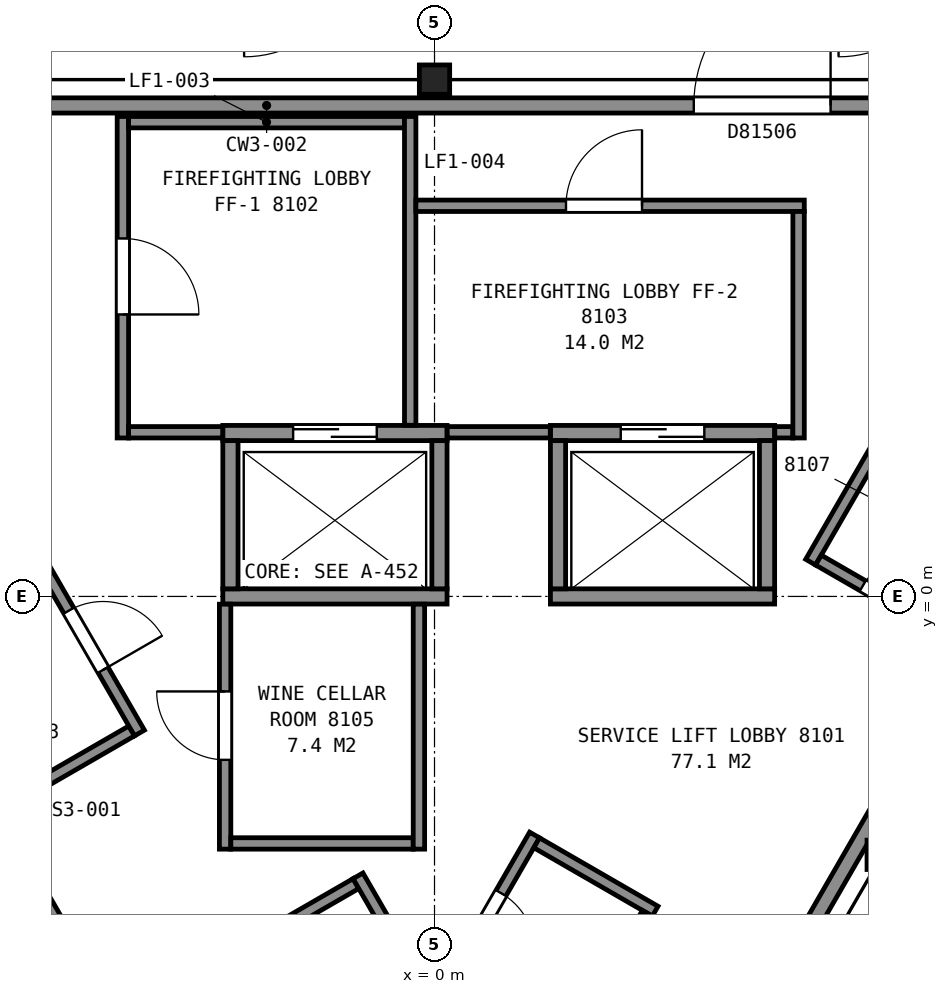
"""IFC4 building model, lengths in metres.
Left out: names, types, materials, properties, quantities, classifications, styles, units other than length and angle.
Written with IfcOpenShell. Run it as: python <this file> out.ifc"""

import sys

from ifc_helpers import new_model, si_unit, direction, frame, frame_2d, origin, origin_2d, place, context, subcontext, project, spatial, rectangle, i_section, extrude, element, fill, save


model = new_model("IFC4")
c1 = context("Model", 3, precision=1e-05, world=origin(), true_north=direction((0.0, 1.0)))
c2 = subcontext(c1, "Body", "Model", "MODEL_VIEW")
j1 = project(units=[si_unit("LENGTHUNIT", "METRE"), si_unit("PLANEANGLEUNIT", "RADIAN")], contexts=[c1])
p1 = place(None, origin())
s1 = spatial("IfcSite", under=j1, at=p1, CompositionType="ELEMENT")
p2 = place(p1, origin())
s2 = spatial("IfcBuilding", under=s1, at=p2, CompositionType="ELEMENT")
p3 = place(p2, frame((0.0, 0.0, 321.0)))
s3 = spatial("IfcBuildingStorey", under=s2, at=p3, CompositionType="ELEMENT", Elevation=321.0)
for number, where, z_axis, x_axis in (
    (1, (0.0, 6.8, 0.0), (0.0, 0.0, 1.0), (1.0, 0.0, 0.0)),
    (2, (5.89, -3.4, 0.0), (0.0, 0.0, 1.0), (1.0, 0.0, 0.0)),
):
    element("IfcColumn", number, at=place(p3, frame(where, z_axis=z_axis, x_axis=x_axis)), inside=s3, PredefinedType="COLUMN", context=c2, shape_type="SweptSolid", body=[
        extrude(i_section(OverallWidth=0.399, OverallDepth=0.386, WebThickness=0.021, FlangeThickness=0.033, FilletRadius=0.015, at=origin_2d()), origin(), (0.0, 0.0, 1.0), 4.2),
    ])
p4 = place(p3, frame((-2.785, 0.0, 0.0), z_axis=(0.0, 0.0, 1.0), x_axis=(1.0, 0.0, 0.0)))
e3 = element("IfcWall", 3, at=p4, inside=s3, PredefinedType="PARTITIONING", context=c2, shape_type="SweptSolid", body=[
    extrude(rectangle(XDim=2.95, YDim=0.2, at=frame_2d((1.475, 0.0))), origin(), (0.0, 0.0, 1.0), 4.2),
])
p5 = place(p3, frame((1.525, 0.0, 0.0), z_axis=(0.0, 0.0, 1.0), x_axis=(1.0, 0.0, 0.0)))
e4 = element("IfcWall", 4, at=p5, inside=s3, PredefinedType="PARTITIONING", context=c2, shape_type="SweptSolid", body=[
    extrude(rectangle(XDim=2.95, YDim=0.2, at=frame_2d((1.475, 0.0))), origin(), (0.0, 0.0, 1.0), 4.2),
])
p6 = place(p3, frame((-2.785, 2.15, 0.0), z_axis=(0.0, 0.0, 1.0), x_axis=(1.0, 0.0, 0.0)))
e5 = element("IfcWall", 5, at=p6, inside=s3, PredefinedType="PARTITIONING", context=c2, shape_type="SweptSolid", body=[
    extrude(rectangle(XDim=2.95, YDim=0.2, at=frame_2d((1.475, 0.0))), origin(), (0.0, 0.0, 1.0), 4.2),
])
p7 = place(p6, frame((0.925, 0.0, 0.0)))
e6 = element("IfcOpeningElement", 6, at=p7, cuts=e5, PredefinedType="OPENING", context=c2, shape_type="SweptSolid", body=[
    extrude(rectangle(XDim=1.1, YDim=2.1, at=frame_2d((0.55, 1.05))), frame((0.0, 0.11, 0.0), z_axis=(0.0, -1.0, 0.0), x_axis=(1.0, 0.0, 0.0)), (0.0, 0.0, 1.0), 0.22),
])
p8 = place(p3, frame((1.525, 2.15, 0.0), z_axis=(0.0, 0.0, 1.0), x_axis=(1.0, 0.0, 0.0)))
e7 = element("IfcWall", 7, at=p8, inside=s3, PredefinedType="PARTITIONING", context=c2, shape_type="SweptSolid", body=[
    extrude(rectangle(XDim=2.95, YDim=0.2, at=frame_2d((1.475, 0.0))), origin(), (0.0, 0.0, 1.0), 4.2),
])
p9 = place(p8, frame((0.925, 0.0, 0.0)))
e8 = element("IfcOpeningElement", 8, at=p9, cuts=e7, PredefinedType="OPENING", context=c2, shape_type="SweptSolid", body=[
    extrude(rectangle(XDim=1.1, YDim=2.1, at=frame_2d((0.55, 1.05))), frame((0.0, 0.11, 0.0), z_axis=(0.0, -1.0, 0.0), x_axis=(1.0, 0.0, 0.0)), (0.0, 0.0, 1.0), 0.22),
])
for number, where, z_axis, x_axis in (
    (9, (4.375, 0.1, 0.0), (0.0, 0.0, 1.0), (0.0, 1.0, 0.0)),
    (10, (1.625, 0.1, 0.0), (0.0, 0.0, 1.0), (0.0, 1.0, 0.0)),
    (11, (0.065, 0.1, 0.0), (0.0, 0.0, 1.0), (0.0, 1.0, 0.0)),
    (12, (-2.685, 0.1, 0.0), (0.0, 0.0, 1.0), (0.0, 1.0, 0.0)),
):
    element("IfcWall", number, at=place(p3, frame(where, z_axis=z_axis, x_axis=x_axis)), inside=s3, PredefinedType="PARTITIONING", context=c2, shape_type="SweptSolid", body=[
        extrude(rectangle(XDim=1.95, YDim=0.2, at=frame_2d((0.975, 0.0))), origin(), (0.0, 0.0, 1.0), 4.2),
    ])
p10 = place(p3, frame((7.829, 6.46, 0.0), z_axis=(0.0, 0.0, 1.0), x_axis=(-1.0, 0.0, 0.0)))
e13 = element("IfcWall", 13, at=p10, inside=s3, PredefinedType="PARTITIONING", context=c2, shape_type="SweptSolid", body=[
    extrude(rectangle(XDim=15.658, YDim=0.2, at=frame_2d((7.829, 0.0))), origin(), (0.0, 0.0, 1.0), 3.95),
])
p11 = place(p10, frame((2.618, 0.0, 0.0)))
e14 = element("IfcOpeningElement", 14, at=p11, cuts=e13, PredefinedType="OPENING", context=c2, shape_type="SweptSolid", body=[
    extrude(rectangle(XDim=1.8, YDim=2.1, at=frame_2d((0.9, 1.05))), frame((0.0, 0.11, 0.0), z_axis=(0.0, -1.0, 0.0), x_axis=(1.0, 0.0, 0.0)), (0.0, 0.0, 1.0), 0.22),
])
p12 = place(p3, frame((-7.141, -0.551, 0.0), z_axis=(0.0, 0.0, 1.0), x_axis=(0.499992795234, -0.866029563418, 0.0)))
e15 = element("IfcWall", 15, at=p12, inside=s3, PredefinedType="PARTITIONING", context=c2, shape_type="SweptSolid", body=[
    extrude(rectangle(XDim=9.198, YDim=0.2, at=frame_2d((4.599, 0.0))), origin(), (0.0, 0.0, 1.0), 3.95),
])
p13 = place(p12, frame((4.634, 0.0, 0.0)))
e16 = element("IfcOpeningElement", 16, at=p13, cuts=e15, PredefinedType="OPENING", context=c2, shape_type="SweptSolid", body=[
    extrude(rectangle(XDim=1.8, YDim=2.1, at=frame_2d((0.9, 1.05))), frame((0.0, 0.11, 0.0), z_axis=(0.0, -1.0, 0.0), x_axis=(1.0, 0.0, 0.0)), (0.0, 0.0, 1.0), 0.22),
])
p14 = place(p3, frame((-5.737, -2.782, 0.0), z_axis=(0.0, 0.0, 1.0), x_axis=(0.866000843773, 0.500042536776, 0.0)))
e17 = element("IfcWall", 17, at=p14, inside=s3, PredefinedType="PARTITIONING", context=c2, shape_type="SweptSolid", body=[
    extrude(rectangle(XDim=2.025, YDim=0.15, at=frame_2d((1.012, 0.0))), origin(), (0.0, 0.0, 1.0), 3.95),
])
p15 = place(p3, frame((-3.882, -1.797, 0.0), z_axis=(0.0, 0.0, 1.0), x_axis=(-0.500016307898, 0.86601598821, 0.0)))
e18 = element("IfcWall", 18, at=p15, inside=s3, PredefinedType="PARTITIONING", context=c2, shape_type="SweptSolid", body=[
    extrude(rectangle(XDim=2.709, YDim=0.15, at=frame_2d((1.354, 0.0))), origin(), (0.0, 0.0, 1.0), 3.95),
])
p16 = place(p15, frame((0.959, 0.0, 0.0)))
e19 = element("IfcOpeningElement", 19, at=p16, cuts=e18, PredefinedType="OPENING", context=c2, shape_type="SweptSolid", body=[
    extrude(rectangle(XDim=0.9, YDim=2.1, at=frame_2d((0.45, 1.05))), frame((0.0, 0.085, 0.0), z_axis=(0.0, -1.0, 0.0), x_axis=(1.0, 0.0, 0.0)), (0.0, 0.0, 1.0), 0.17),
])
p17 = place(p3, frame((-4.1, 2.085, 0.0), z_axis=(0.0, 0.0, 1.0), x_axis=(0.0, 1.0, 0.0)))
e20 = element("IfcWall", 20, at=p17, inside=s3, PredefinedType="PARTITIONING", context=c2, shape_type="SweptSolid", body=[
    extrude(rectangle(XDim=4.23, YDim=0.15, at=frame_2d((2.115, 0.0))), origin(), (0.0, 0.0, 1.0), 3.95),
])
p18 = place(p17, frame((1.625, 0.0, 0.0)))
e21 = element("IfcOpeningElement", 21, at=p18, cuts=e20, PredefinedType="OPENING", context=c2, shape_type="SweptSolid", body=[
    extrude(rectangle(XDim=1.0, YDim=2.1, at=frame_2d((0.5, 1.05))), frame((0.0, 0.085, 0.0), z_axis=(0.0, -1.0, 0.0), x_axis=(1.0, 0.0, 0.0)), (0.0, 0.0, 1.0), 0.17),
])
p19 = place(p3, frame((-4.025, 2.16, 0.0), z_axis=(0.0, 0.0, 1.0), x_axis=(1.0, 0.0, 0.0)))
e22 = element("IfcWall", 22, at=p19, inside=s3, PredefinedType="PARTITIONING", context=c2, shape_type="SweptSolid", body=[
    extrude(rectangle(XDim=1.238, YDim=0.15, at=frame_2d((0.619, 0.0))), origin(), (0.0, 0.0, 1.0), 3.95),
])
p20 = place(p3, frame((-4.025, 6.24, 0.0), z_axis=(0.0, 0.0, 1.0), x_axis=(1.0, 0.0, 0.0)))
e23 = element("IfcWall", 23, at=p20, inside=s3, PredefinedType="PARTITIONING", context=c2, shape_type="SweptSolid", body=[
    extrude(rectangle(XDim=3.63, YDim=0.15, at=frame_2d((1.815, 0.0))), origin(), (0.0, 0.0, 1.0), 3.95),
])
p21 = place(p3, frame((-2.755, -0.102, 0.0), z_axis=(0.0, 0.0, 1.0), x_axis=(0.0, -1.0, 0.0)))
e24 = element("IfcWall", 24, at=p21, inside=s3, PredefinedType="PARTITIONING", context=c2, shape_type="SweptSolid", body=[
    extrude(rectangle(XDim=3.223, YDim=0.15, at=frame_2d((1.611, 0.0))), origin(), (0.0, 0.0, 1.0), 3.95),
])
p22 = place(p21, frame((1.148, 0.0, 0.0)))
e25 = element("IfcOpeningElement", 25, at=p22, cuts=e24, PredefinedType="OPENING", context=c2, shape_type="SweptSolid", body=[
    extrude(rectangle(XDim=0.9, YDim=2.1, at=frame_2d((0.45, 1.05))), frame((0.0, 0.085, 0.0), z_axis=(0.0, -1.0, 0.0), x_axis=(1.0, 0.0, 0.0)), (0.0, 0.0, 1.0), 0.17),
])
p23 = place(p3, frame((-2.68, -3.25, 0.0), z_axis=(0.0, 0.0, 1.0), x_axis=(1.0, 0.0, 0.0)))
e26 = element("IfcWall", 26, at=p23, inside=s3, PredefinedType="PARTITIONING", context=c2, shape_type="SweptSolid", body=[
    extrude(rectangle(XDim=2.4, YDim=0.15, at=frame_2d((1.2, 0.0))), origin(), (0.0, 0.0, 1.0), 3.95),
])
p24 = place(p3, frame((-2.593, -4.678, 0.0), z_axis=(0.0, 0.0, 1.0), x_axis=(0.866081705922, 0.499902469156, 0.0)))
e27 = element("IfcWall", 27, at=p24, inside=s3, PredefinedType="PARTITIONING", context=c2, shape_type="SweptSolid", body=[
    extrude(rectangle(XDim=1.8, YDim=0.15, at=frame_2d((0.9, 0.0))), origin(), (0.0, 0.0, 1.0), 3.95),
])
p25 = place(p3, frame((-1.007, -3.676, 0.0), z_axis=(0.0, 0.0, 1.0), x_axis=(0.500037662692, -0.866003658127, 0.0)))
e28 = element("IfcWall", 28, at=p25, inside=s3, PredefinedType="PARTITIONING", context=c2, shape_type="SweptSolid", body=[
    extrude(rectangle(XDim=4.425, YDim=0.15, at=frame_2d((2.212, 0.0))), origin(), (0.0, 0.0, 1.0), 3.95),
])
p26 = place(p3, frame((-0.32, 2.252, 0.0), z_axis=(0.0, 0.0, 1.0), x_axis=(0.0, 1.0, 0.0)))
e29 = element("IfcWall", 29, at=p26, inside=s3, PredefinedType="PARTITIONING", context=c2, shape_type="SweptSolid", body=[
    extrude(rectangle(XDim=4.063, YDim=0.15, at=frame_2d((2.031, 0.0))), origin(), (0.0, 0.0, 1.0), 3.95),
])
p27 = place(p3, frame((-0.245, 5.14, 0.0), z_axis=(0.0, 0.0, 1.0), x_axis=(1.0, 0.0, 0.0)))
e30 = element("IfcWall", 30, at=p27, inside=s3, PredefinedType="PARTITIONING", context=c2, shape_type="SweptSolid", body=[
    extrude(rectangle(XDim=5.11, YDim=0.15, at=frame_2d((2.555, 0.0))), origin(), (0.0, 0.0, 1.0), 3.95),
])
p28 = place(p27, frame((1.975, 0.0, 0.0)))
e31 = element("IfcOpeningElement", 31, at=p28, cuts=e30, PredefinedType="OPENING", context=c2, shape_type="SweptSolid", body=[
    extrude(rectangle(XDim=1.0, YDim=2.1, at=frame_2d((0.5, 1.05))), frame((0.0, 0.085, 0.0), z_axis=(0.0, -1.0, 0.0), x_axis=(1.0, 0.0, 0.0)), (0.0, 0.0, 1.0), 0.17),
])
p29 = place(p3, frame((-0.205, -3.325, 0.0), z_axis=(0.0, 0.0, 1.0), x_axis=(0.0, 1.0, 0.0)))
e32 = element("IfcWall", 32, at=p29, inside=s3, PredefinedType="PARTITIONING", context=c2, shape_type="SweptSolid", body=[
    extrude(rectangle(XDim=3.223, YDim=0.15, at=frame_2d((1.611, 0.0))), origin(), (0.0, 0.0, 1.0), 3.95),
])
p30 = place(p3, frame((1.316, -3.139, 0.0), z_axis=(0.0, 0.0, 1.0), x_axis=(-0.500063042646, -0.865989003036, 0.0)))
e33 = element("IfcWall", 33, at=p30, inside=s3, PredefinedType="PARTITIONING", context=c2, shape_type="SweptSolid", body=[
    extrude(rectangle(XDim=2.503, YDim=0.15, at=frame_2d((1.251, 0.0))), origin(), (0.0, 0.0, 1.0), 3.95),
])
p31 = place(p30, frame((0.883, 0.0, 0.0)))
e34 = element("IfcOpeningElement", 34, at=p31, cuts=e33, PredefinedType="OPENING", context=c2, shape_type="SweptSolid", body=[
    extrude(rectangle(XDim=0.9, YDim=2.1, at=frame_2d((0.45, 1.05))), frame((0.0, 0.085, 0.0), z_axis=(0.0, -1.0, 0.0), x_axis=(1.0, 0.0, 0.0)), (0.0, 0.0, 1.0), 0.17),
])
p32 = place(p3, frame((0.167, 2.16, 0.0), z_axis=(0.0, 0.0, 1.0), x_axis=(1.0, 0.0, 0.0)))
e35 = element("IfcWall", 35, at=p32, inside=s3, PredefinedType="PARTITIONING", context=c2, shape_type="SweptSolid", body=[
    extrude(rectangle(XDim=1.356, YDim=0.15, at=frame_2d((0.678, 0.0))), origin(), (0.0, 0.0, 1.0), 3.95),
])
p33 = place(p3, frame((1.344, -3.241, 0.0), z_axis=(0.0, 0.0, 1.0), x_axis=(0.865989075817, -0.500062916607, 0.0)))
e36 = element("IfcWall", 36, at=p33, inside=s3, PredefinedType="PARTITIONING", context=c2, shape_type="SweptSolid", body=[
    extrude(rectangle(XDim=1.8, YDim=0.15, at=frame_2d((0.9, 0.0))), origin(), (0.0, 0.0, 1.0), 3.95),
])
p34 = place(p3, frame((2.176, -5.251, 0.0), z_axis=(0.0, 0.0, 1.0), x_axis=(0.500173430036, 0.86592525075, 0.0)))
e37 = element("IfcWall", 37, at=p34, inside=s3, PredefinedType="PARTITIONING", context=c2, shape_type="SweptSolid", body=[
    extrude(rectangle(XDim=1.25, YDim=0.15, at=frame_2d((0.625, 0.0))), origin(), (0.0, 0.0, 1.0), 3.95),
])
p35 = place(p3, frame((2.552, -8.5, 0.0), z_axis=(0.0, 0.0, 1.0), x_axis=(0.499967462014, 0.866044188784, 0.0)))
e38 = element("IfcWall", 38, at=p35, inside=s3, PredefinedType="PARTITIONING", context=c2, shape_type="SweptSolid", body=[
    extrude(rectangle(XDim=13.025, YDim=0.2, at=frame_2d((6.512, 0.0))), origin(), (0.0, 0.0, 1.0), 3.95),
])
p36 = place(p3, frame((4.477, 2.16, 0.0), z_axis=(0.0, 0.0, 1.0), x_axis=(1.0, 0.0, 0.0)))
e39 = element("IfcWall", 39, at=p36, inside=s3, PredefinedType="PARTITIONING", context=c2, shape_type="SweptSolid", body=[
    extrude(rectangle(XDim=0.238, YDim=0.15, at=frame_2d((0.119, 0.0))), origin(), (0.0, 0.0, 1.0), 3.95),
])
p37 = place(p3, frame((4.79, 2.085, 0.0), z_axis=(0.0, 0.0, 1.0), x_axis=(0.0, 1.0, 0.0)))
e40 = element("IfcWall", 40, at=p37, inside=s3, PredefinedType="PARTITIONING", context=c2, shape_type="SweptSolid", body=[
    extrude(rectangle(XDim=2.98, YDim=0.15, at=frame_2d((1.49, 0.0))), origin(), (0.0, 0.0, 1.0), 3.95),
])
p38 = place(p3, frame((6.946, 3.91, 0.0), z_axis=(0.0, 0.0, 1.0), x_axis=(-0.50003111728, -0.866007437469, 0.0)))
e41 = element("IfcWall", 41, at=p38, inside=s3, PredefinedType="PARTITIONING", context=c2, shape_type="SweptSolid", body=[
    extrude(rectangle(XDim=3.994, YDim=0.15, at=frame_2d((1.997, 0.0))), origin(), (0.0, 0.0, 1.0), 3.95),
])
p39 = place(p38, frame((0.519, 0.0, 0.0)))
e42 = element("IfcOpeningElement", 42, at=p39, cuts=e41, PredefinedType="OPENING", context=c2, shape_type="SweptSolid", body=[
    extrude(rectangle(XDim=0.9, YDim=2.1, at=frame_2d((0.45, 1.05))), frame((0.0, 0.085, 0.0), z_axis=(0.0, -1.0, 0.0), x_axis=(1.0, 0.0, 0.0)), (0.0, 0.0, 1.0), 0.17),
])
p40 = place(p3, frame((5.051, 0.479, 0.0), z_axis=(0.0, 0.0, 1.0), x_axis=(0.865944298464, -0.500140452231, 0.0)))
e43 = element("IfcWall", 43, at=p40, inside=s3, PredefinedType="PARTITIONING", context=c2, shape_type="SweptSolid", body=[
    extrude(rectangle(XDim=2.224, YDim=0.15, at=frame_2d((1.112, 0.0))), origin(), (0.0, 0.0, 1.0), 3.95),
])
p41 = place(p40, frame((0.675, 0.0, 0.0)))
e44 = element("IfcOpeningElement", 44, at=p41, cuts=e43, PredefinedType="OPENING", context=c2, shape_type="SweptSolid", body=[
    extrude(rectangle(XDim=0.9, YDim=2.1, at=frame_2d((0.45, 1.05))), frame((0.0, 0.085, 0.0), z_axis=(0.0, -1.0, 0.0), x_axis=(1.0, 0.0, 0.0)), (0.0, 0.0, 1.0), 0.17),
])
p42 = place(p3, frame((-3.744, -10.714, 0.0), z_axis=(0.0, 0.0, 1.0), x_axis=(-0.500044034969, 0.86599997869, 0.0)))
e45 = element("IfcWall", 45, at=p42, inside=s3, PredefinedType="PARTITIONING", context=c2, shape_type="SweptSolid", body=[
    extrude(rectangle(XDim=15.553, YDim=0.1, at=frame_2d((7.776, 0.0))), origin(), (0.0, 0.0, 1.0), 3.297),
])
p43 = place(p42, frame((7.814, 0.0, 0.0)))
e46 = element("IfcOpeningElement", 46, at=p43, cuts=e45, PredefinedType="OPENING", context=c2, shape_type="SweptSolid", body=[
    extrude(rectangle(XDim=1.5, YDim=2.1, at=frame_2d((0.75, 1.05))), frame((0.0, 0.06, 0.0), z_axis=(0.0, -1.0, 0.0), x_axis=(1.0, 0.0, 0.0)), (0.0, 0.0, 1.0), 0.12),
])
p44 = place(p3, frame((11.521, 2.754, 0.0), z_axis=(0.0, 0.0, 1.0), x_axis=(-0.500044034969, -0.86599997869, 0.0)))
e47 = element("IfcWall", 47, at=p44, inside=s3, PredefinedType="PARTITIONING", context=c2, shape_type="SweptSolid", body=[
    extrude(rectangle(XDim=15.553, YDim=0.1, at=frame_2d((7.776, 0.0))), origin(), (0.0, 0.0, 1.0), 3.297),
])
p45 = place(p44, frame((13.803, 0.0, 0.0)))
e48 = element("IfcOpeningElement", 48, at=p45, cuts=e47, PredefinedType="OPENING", context=c2, shape_type="SweptSolid", body=[
    extrude(rectangle(XDim=1.2, YDim=2.1, at=frame_2d((0.6, 1.05))), frame((0.0, 0.06, 0.0), z_axis=(0.0, -1.0, 0.0), x_axis=(1.0, 0.0, 0.0)), (0.0, 0.0, 1.0), 0.12),
])
p46 = place(p44, frame((8.665, 0.0, 0.0)))
e49 = element("IfcOpeningElement", 49, at=p46, cuts=e47, PredefinedType="OPENING", context=c2, shape_type="SweptSolid", body=[
    extrude(rectangle(XDim=1.2, YDim=2.1, at=frame_2d((0.6, 1.05))), frame((0.0, 0.06, 0.0), z_axis=(0.0, -1.0, 0.0), x_axis=(1.0, 0.0, 0.0)), (0.0, 0.0, 1.0), 0.12),
])
p47 = place(p44, frame((2.049, 0.0, 0.0)))
e50 = element("IfcOpeningElement", 50, at=p47, cuts=e47, PredefinedType="OPENING", context=c2, shape_type="SweptSolid", body=[
    extrude(rectangle(XDim=1.2, YDim=2.1, at=frame_2d((0.6, 1.05))), frame((0.0, 0.06, 0.0), z_axis=(0.0, -1.0, 0.0), x_axis=(1.0, 0.0, 0.0)), (0.0, 0.0, 1.0), 0.12),
])
p48 = place(p7, origin())
e51 = element("IfcDoor", 51, at=p48, inside=s3, OperationType="SLIDING_TO_LEFT", PredefinedType="DOOR", context=c2, shape_type="SweptSolid", body=[
    extrude(rectangle(XDim=1.1, YDim=2.1, at=frame_2d((0.55, 1.05))), frame((0.0, 0.025, 0.0), z_axis=(0.0, -1.0, 0.0), x_axis=(1.0, 0.0, 0.0)), (0.0, 0.0, 1.0), 0.05),
])
fill(e6, e51)
p49 = place(p9, origin())
e52 = element("IfcDoor", 52, at=p49, inside=s3, OperationType="SLIDING_TO_RIGHT", PredefinedType="DOOR", context=c2, shape_type="SweptSolid", body=[
    extrude(rectangle(XDim=1.1, YDim=2.1, at=frame_2d((0.55, 1.05))), frame((0.0, 0.025, 0.0), z_axis=(0.0, -1.0, 0.0), x_axis=(1.0, 0.0, 0.0)), (0.0, 0.0, 1.0), 0.05),
])
fill(e8, e52)
p50 = place(p11, origin())
e53 = element("IfcDoor", 53, at=p50, inside=s3, OperationType="DOUBLE_DOOR_SINGLE_SWING", PredefinedType="DOOR", context=c2, shape_type="SweptSolid", body=[
    extrude(rectangle(XDim=1.8, YDim=2.1, at=frame_2d((0.9, 1.05))), frame((0.0, 0.025, 0.0), z_axis=(0.0, -1.0, 0.0), x_axis=(1.0, 0.0, 0.0)), (0.0, 0.0, 1.0), 0.05),
])
fill(e14, e53)
p51 = place(p16, origin())
e54 = element("IfcDoor", 54, at=p51, inside=s3, OperationType="SINGLE_SWING_LEFT", PredefinedType="DOOR", context=c2, shape_type="SweptSolid", body=[
    extrude(rectangle(XDim=0.9, YDim=2.1, at=frame_2d((0.45, 1.05))), frame((0.0, 0.025, 0.0), z_axis=(0.0, -1.0, 0.0), x_axis=(1.0, 0.0, 0.0)), (0.0, 0.0, 1.0), 0.05),
])
fill(e19, e54)
p52 = place(p18, origin())
e55 = element("IfcDoor", 55, at=p52, inside=s3, OperationType="SINGLE_SWING_LEFT", PredefinedType="DOOR", context=c2, shape_type="SweptSolid", body=[
    extrude(rectangle(XDim=1.0, YDim=2.1, at=frame_2d((0.5, 1.05))), frame((0.0, 0.025, 0.0), z_axis=(0.0, -1.0, 0.0), x_axis=(1.0, 0.0, 0.0)), (0.0, 0.0, 1.0), 0.05),
])
fill(e21, e55)
p53 = place(p22, origin())
e56 = element("IfcDoor", 56, at=p53, inside=s3, OperationType="SINGLE_SWING_LEFT", PredefinedType="DOOR", context=c2, shape_type="SweptSolid", body=[
    extrude(rectangle(XDim=0.9, YDim=2.1, at=frame_2d((0.45, 1.05))), frame((0.0, 0.025, 0.0), z_axis=(0.0, -1.0, 0.0), x_axis=(1.0, 0.0, 0.0)), (0.0, 0.0, 1.0), 0.05),
])
fill(e25, e56)
p54 = place(p28, origin())
e57 = element("IfcDoor", 57, at=p54, inside=s3, OperationType="SINGLE_SWING_RIGHT", PredefinedType="DOOR", context=c2, shape_type="SweptSolid", body=[
    extrude(rectangle(XDim=1.0, YDim=2.1, at=frame_2d((0.5, 1.05))), frame((0.0, 0.025, 0.0), z_axis=(0.0, -1.0, 0.0), x_axis=(1.0, 0.0, 0.0)), (0.0, 0.0, 1.0), 0.05),
])
fill(e31, e57)
p55 = place(p31, origin())
e58 = element("IfcDoor", 58, at=p55, inside=s3, OperationType="SINGLE_SWING_RIGHT", PredefinedType="DOOR", context=c2, shape_type="SweptSolid", body=[
    extrude(rectangle(XDim=0.9, YDim=2.1, at=frame_2d((0.45, 1.05))), frame((0.0, 0.025, 0.0), z_axis=(0.0, -1.0, 0.0), x_axis=(1.0, 0.0, 0.0)), (0.0, 0.0, 1.0), 0.05),
])
fill(e34, e58)
p56 = place(p41, origin())
e59 = element("IfcDoor", 59, at=p56, inside=s3, OperationType="SINGLE_SWING_RIGHT", PredefinedType="DOOR", context=c2, shape_type="SweptSolid", body=[
    extrude(rectangle(XDim=0.9, YDim=2.1, at=frame_2d((0.45, 1.05))), frame((0.0, 0.025, 0.0), z_axis=(0.0, -1.0, 0.0), x_axis=(1.0, 0.0, 0.0)), (0.0, 0.0, 1.0), 0.05),
])
fill(e44, e59)
save(model, sys.argv[1])
